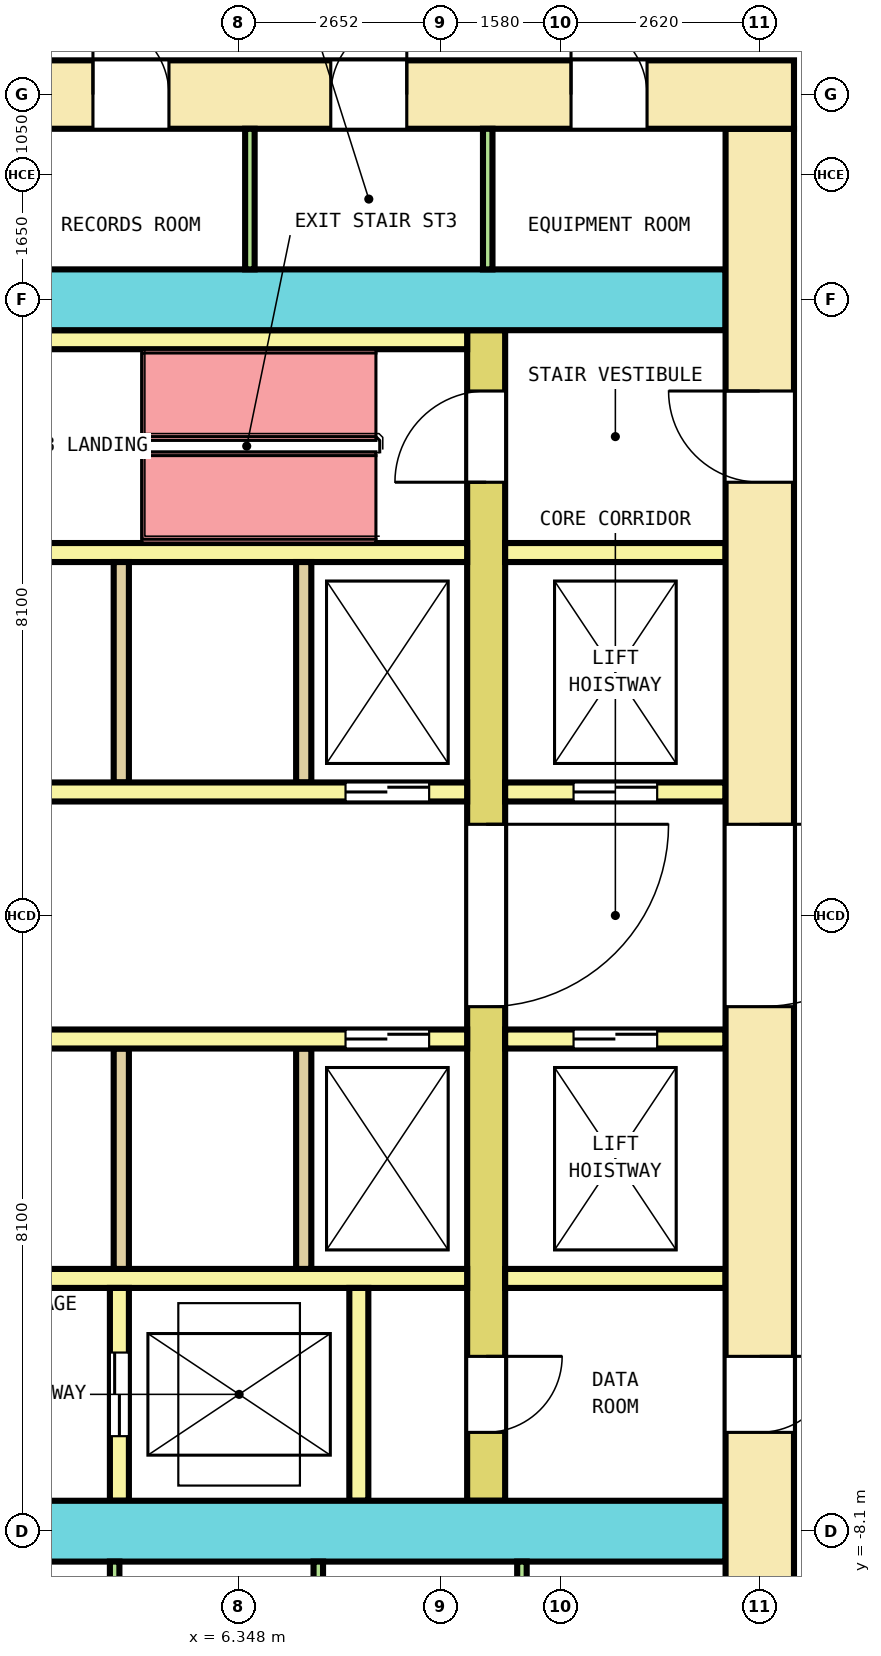
"""IFC4 building model, lengths in metres.
Left out: names, types, materials, properties, quantities, classifications, styles, units other than length and angle.
Written with IfcOpenShell. Run it as: python <this file> out.ifc"""

import sys

from ifc_helpers import new_model, si_unit, direction, frame, frame_2d, origin, place, context, subcontext, project, spatial, rectangle, extrude, element, fill, save


model = new_model("IFC4")
c1 = context("Model", 3, precision=1e-05, world=origin(), true_north=direction((0.0, 1.0)))
c2 = subcontext(c1, "Body", "Model", "MODEL_VIEW")
j1 = project(units=[si_unit("LENGTHUNIT", "METRE"), si_unit("PLANEANGLEUNIT", "RADIAN")], contexts=[c1])
p1 = place(None, origin())
s1 = spatial("IfcSite", under=j1, at=p1, CompositionType="ELEMENT")
p2 = place(p1, origin())
s2 = spatial("IfcBuilding", under=s1, at=p2, CompositionType="ELEMENT")
p3 = place(p2, frame((0.0, 0.0, 23.4)))
s3 = spatial("IfcBuildingStorey", under=s2, at=p3, CompositionType="ELEMENT", Elevation=23.4)
p4 = place(p3, frame((-13.65, 10.8, 0.0), z_axis=(0.0, 0.0, 1.0), x_axis=(1.0, 0.0, 0.0)))
e1 = element("IfcWall", 1, at=p4, inside=s3, PredefinedType="SHEAR", context=c2, shape_type="SweptSolid", body=[
    extrude(rectangle(XDim=27.3, YDim=0.9, at=frame_2d((13.65, 0.0))), origin(), (0.0, 0.0, 1.0), 4.1),
])
p5 = place(p4, frame((1.892, 0.0, 0.0)))
e2 = element("IfcOpeningElement", 2, at=p5, cuts=e1, PredefinedType="OPENING", context=c2, shape_type="SweptSolid", body=[
    extrude(rectangle(XDim=1.0, YDim=2.1, at=frame_2d((0.5, 1.05))), frame((0.0, 0.46, 0.0), z_axis=(0.0, -1.0, 0.0), x_axis=(1.0, 0.0, 0.0)), (0.0, 0.0, 1.0), 0.92),
])
p6 = place(p4, frame((4.97, 0.0, 0.0)))
e3 = element("IfcOpeningElement", 3, at=p6, cuts=e1, PredefinedType="OPENING", context=c2, shape_type="SweptSolid", body=[
    extrude(rectangle(XDim=1.0, YDim=2.1, at=frame_2d((0.5, 1.05))), frame((0.0, 0.46, 0.0), z_axis=(0.0, -1.0, 0.0), x_axis=(1.0, 0.0, 0.0)), (0.0, 0.0, 1.0), 0.92),
])
p7 = place(p4, frame((8.017, 0.0, 0.0)))
e4 = element("IfcOpeningElement", 4, at=p7, cuts=e1, PredefinedType="OPENING", context=c2, shape_type="SweptSolid", body=[
    extrude(rectangle(XDim=1.0, YDim=2.1, at=frame_2d((0.5, 1.05))), frame((0.0, 0.46, 0.0), z_axis=(0.0, -1.0, 0.0), x_axis=(1.0, 0.0, 0.0)), (0.0, 0.0, 1.0), 0.92),
])
p8 = place(p4, frame((11.064, 0.0, 0.0)))
e5 = element("IfcOpeningElement", 5, at=p8, cuts=e1, PredefinedType="OPENING", context=c2, shape_type="SweptSolid", body=[
    extrude(rectangle(XDim=1.0, YDim=2.1, at=frame_2d((0.5, 1.05))), frame((0.0, 0.46, 0.0), z_axis=(0.0, -1.0, 0.0), x_axis=(1.0, 0.0, 0.0)), (0.0, 0.0, 1.0), 0.92),
])
p9 = place(p4, frame((18.077, 0.0, 0.0)))
e6 = element("IfcOpeningElement", 6, at=p9, cuts=e1, PredefinedType="OPENING", context=c2, shape_type="SweptSolid", body=[
    extrude(rectangle(XDim=1.0, YDim=2.1, at=frame_2d((0.5, 1.05))), frame((0.0, 0.46, 0.0), z_axis=(0.0, -1.0, 0.0), x_axis=(1.0, 0.0, 0.0)), (0.0, 0.0, 1.0), 0.92),
])
p10 = place(p4, frame((21.206, 0.0, 0.0)))
e7 = element("IfcOpeningElement", 7, at=p10, cuts=e1, PredefinedType="OPENING", context=c2, shape_type="SweptSolid", body=[
    extrude(rectangle(XDim=1.0, YDim=2.1, at=frame_2d((0.5, 1.05))), frame((0.0, 0.46, 0.0), z_axis=(0.0, -1.0, 0.0), x_axis=(1.0, 0.0, 0.0)), (0.0, 0.0, 1.0), 0.92),
])
p11 = place(p4, frame((24.367, 0.0, 0.0)))
e8 = element("IfcOpeningElement", 8, at=p11, cuts=e1, PredefinedType="OPENING", context=c2, shape_type="SweptSolid", body=[
    extrude(rectangle(XDim=1.0, YDim=2.1, at=frame_2d((0.5, 1.05))), frame((0.0, 0.46, 0.0), z_axis=(0.0, -1.0, 0.0), x_axis=(1.0, 0.0, 0.0)), (0.0, 0.0, 1.0), 0.92),
])
p12 = place(p4, frame((14.575, 0.0, 0.0)))
e9 = element("IfcOpeningElement", 9, at=p12, cuts=e1, PredefinedType="OPENING", context=c2, shape_type="SweptSolid", body=[
    extrude(rectangle(XDim=1.4, YDim=2.1, at=frame_2d((0.7, 1.05))), frame((0.0, 0.46, 0.0), z_axis=(0.0, -1.0, 0.0), x_axis=(1.0, 0.0, 0.0)), (0.0, 0.0, 1.0), 0.92),
])
p13 = place(p3, frame((13.2, -10.35, 0.0), z_axis=(0.0, 0.0, 1.0), x_axis=(0.0, 1.0, 0.0)))
e10 = element("IfcWall", 10, at=p13, inside=s3, PredefinedType="SHEAR", context=c2, shape_type="SweptSolid", body=[
    extrude(rectangle(XDim=20.7, YDim=0.9, at=frame_2d((10.35, 0.0))), origin(), (0.0, 0.0, 1.0), 4.1),
])
p14 = place(p13, frame((9.15, 0.0, 0.0)))
e11 = element("IfcOpeningElement", 11, at=p14, cuts=e10, PredefinedType="OPENING", context=c2, shape_type="SweptSolid", body=[
    extrude(rectangle(XDim=2.4, YDim=2.1, at=frame_2d((1.2, 1.05))), frame((0.0, 0.46, 0.0), z_axis=(0.0, -1.0, 0.0), x_axis=(1.0, 0.0, 0.0)), (0.0, 0.0, 1.0), 0.92),
])
p15 = place(p13, frame((16.05, 0.0, 0.0)))
e12 = element("IfcOpeningElement", 12, at=p15, cuts=e10, PredefinedType="OPENING", context=c2, shape_type="SweptSolid", body=[
    extrude(rectangle(XDim=1.2, YDim=2.1, at=frame_2d((0.6, 1.05))), frame((0.0, 0.46, 0.0), z_axis=(0.0, -1.0, 0.0), x_axis=(1.0, 0.0, 0.0)), (0.0, 0.0, 1.0), 0.92),
])
p16 = place(p13, frame((3.55, 0.0, 0.0)))
e13 = element("IfcOpeningElement", 13, at=p16, cuts=e10, PredefinedType="OPENING", context=c2, shape_type="SweptSolid", body=[
    extrude(rectangle(XDim=1.0, YDim=2.1, at=frame_2d((0.5, 1.05))), frame((0.0, 0.46, 0.0), z_axis=(0.0, -1.0, 0.0), x_axis=(1.0, 0.0, 0.0)), (0.0, 0.0, 1.0), 0.92),
])
p17 = place(p3, frame((-12.75, 8.1, 0.0), z_axis=(0.0, 0.0, 1.0), x_axis=(1.0, 0.0, 0.0)))
e14 = element("IfcWall", 14, at=p17, inside=s3, PredefinedType="SHEAR", context=c2, shape_type="SweptSolid", body=[
    extrude(rectangle(XDim=25.5, YDim=0.8, at=frame_2d((12.75, 0.0))), origin(), (0.0, 0.0, 1.0), 4.1),
])
p18 = place(p17, frame((13.675, 0.0, 0.0)))
e15 = element("IfcOpeningElement", 15, at=p18, cuts=e14, PredefinedType="OPENING", context=c2, shape_type="SweptSolid", body=[
    extrude(rectangle(XDim=1.4, YDim=2.1, at=frame_2d((0.7, 1.05))), frame((0.0, 0.41, 0.0), z_axis=(0.0, -1.0, 0.0), x_axis=(1.0, 0.0, 0.0)), (0.0, 0.0, 1.0), 0.82),
])
p19 = place(p3, frame((-12.75, -8.1, 0.0), z_axis=(0.0, 0.0, 1.0), x_axis=(1.0, 0.0, 0.0)))
e16 = element("IfcWall", 16, at=p19, inside=s3, PredefinedType="SHEAR", context=c2, shape_type="SweptSolid", body=[
    extrude(rectangle(XDim=25.5, YDim=0.8, at=frame_2d((12.75, 0.0))), origin(), (0.0, 0.0, 1.0), 4.1),
])
p20 = place(p19, frame((14.3, 0.0, 0.0)))
e17 = element("IfcOpeningElement", 17, at=p20, cuts=e16, PredefinedType="OPENING", context=c2, shape_type="SweptSolid", body=[
    extrude(rectangle(XDim=1.2, YDim=2.1, at=frame_2d((0.6, 1.05))), frame((0.0, 0.41, 0.0), z_axis=(0.0, -1.0, 0.0), x_axis=(1.0, 0.0, 0.0)), (0.0, 0.0, 1.0), 0.82),
])
p21 = place(p3, frame((9.6, -7.7, 0.0), z_axis=(0.0, 0.0, 1.0), x_axis=(0.0, 1.0, 0.0)))
e18 = element("IfcWall", 18, at=p21, inside=s3, PredefinedType="SHEAR", context=c2, shape_type="SweptSolid", body=[
    extrude(rectangle(XDim=15.4, YDim=0.5, at=frame_2d((7.7, 0.0))), origin(), (0.0, 0.0, 1.0), 4.1),
])
p22 = place(p21, frame((6.5, 0.0, 0.0)))
e19 = element("IfcOpeningElement", 19, at=p22, cuts=e18, PredefinedType="OPENING", context=c2, shape_type="SweptSolid", body=[
    extrude(rectangle(XDim=2.4, YDim=2.1, at=frame_2d((1.2, 1.05))), frame((0.0, 0.26, 0.0), z_axis=(0.0, -1.0, 0.0), x_axis=(1.0, 0.0, 0.0)), (0.0, 0.0, 1.0), 0.52),
])
p23 = place(p21, frame((13.4, 0.0, 0.0)))
e20 = element("IfcOpeningElement", 20, at=p23, cuts=e18, PredefinedType="OPENING", context=c2, shape_type="SweptSolid", body=[
    extrude(rectangle(XDim=1.2, YDim=2.1, at=frame_2d((0.6, 1.05))), frame((0.0, 0.26, 0.0), z_axis=(0.0, -1.0, 0.0), x_axis=(1.0, 0.0, 0.0)), (0.0, 0.0, 1.0), 0.52),
])
p24 = place(p21, frame((0.9, 0.0, 0.0)))
e21 = element("IfcOpeningElement", 21, at=p24, cuts=e18, PredefinedType="OPENING", context=c2, shape_type="SweptSolid", body=[
    extrude(rectangle(XDim=1.0, YDim=2.1, at=frame_2d((0.5, 1.05))), frame((0.0, 0.26, 0.0), z_axis=(0.0, -1.0, 0.0), x_axis=(1.0, 0.0, 0.0)), (0.0, 0.0, 1.0), 0.52),
])
p25 = place(p3, frame((-9.35, 1.625, 0.0), z_axis=(0.0, 0.0, 1.0), x_axis=(1.0, 0.0, 0.0)))
e22 = element("IfcWall", 22, at=p25, inside=s3, PredefinedType="SOLIDWALL", context=c2, shape_type="SweptSolid", body=[
    extrude(rectangle(XDim=18.7, YDim=0.25, at=frame_2d((9.35, 0.0))), origin(), (0.0, 0.0, 1.0), 4.1),
])
p26 = place(p25, frame((0.5, 0.0, 0.0)))
e23 = element("IfcOpeningElement", 23, at=p26, cuts=e22, PredefinedType="OPENING", context=c2, shape_type="SweptSolid", body=[
    extrude(rectangle(XDim=1.1, YDim=2.1, at=frame_2d((0.55, 1.05))), frame((0.0, 0.135, 0.0), z_axis=(0.0, -1.0, 0.0), x_axis=(1.0, 0.0, 0.0)), (0.0, 0.0, 1.0), 0.27),
])
p27 = place(p25, frame((17.1, 0.0, 0.0)))
e24 = element("IfcOpeningElement", 24, at=p27, cuts=e22, PredefinedType="OPENING", context=c2, shape_type="SweptSolid", body=[
    extrude(rectangle(XDim=1.1, YDim=2.1, at=frame_2d((0.55, 1.05))), frame((0.0, 0.135, 0.0), z_axis=(0.0, -1.0, 0.0), x_axis=(1.0, 0.0, 0.0)), (0.0, 0.0, 1.0), 0.27),
])
p28 = place(p3, frame((9.85, 1.625, 0.0), z_axis=(0.0, 0.0, 1.0), x_axis=(1.0, 0.0, 0.0)))
e25 = element("IfcWall", 25, at=p28, inside=s3, PredefinedType="SOLIDWALL", context=c2, shape_type="SweptSolid", body=[
    extrude(rectangle(XDim=2.9, YDim=0.25, at=frame_2d((1.45, 0.0))), origin(), (0.0, 0.0, 1.0), 4.1),
])
p29 = place(p28, frame((0.9, 0.0, 0.0)))
e26 = element("IfcOpeningElement", 26, at=p29, cuts=e25, PredefinedType="OPENING", context=c2, shape_type="SweptSolid", body=[
    extrude(rectangle(XDim=1.1, YDim=2.1, at=frame_2d((0.55, 1.05))), frame((0.0, 0.135, 0.0), z_axis=(0.0, -1.0, 0.0), x_axis=(1.0, 0.0, 0.0)), (0.0, 0.0, 1.0), 0.27),
])
p30 = place(p3, frame((-9.35, 4.775, 0.0), z_axis=(0.0, 0.0, 1.0), x_axis=(1.0, 0.0, 0.0)))
e27 = element("IfcWall", 27, at=p30, inside=s3, PredefinedType="SOLIDWALL", context=c2, shape_type="SweptSolid", body=[
    extrude(rectangle(XDim=18.7, YDim=0.25, at=frame_2d((9.35, 0.0))), origin(), (0.0, 0.0, 1.0), 4.1),
])
p31 = place(p3, frame((9.85, 4.775, 0.0), z_axis=(0.0, 0.0, 1.0), x_axis=(1.0, 0.0, 0.0)))
e28 = element("IfcWall", 28, at=p31, inside=s3, PredefinedType="SOLIDWALL", context=c2, shape_type="SweptSolid", body=[
    extrude(rectangle(XDim=2.9, YDim=0.25, at=frame_2d((1.45, 0.0))), origin(), (0.0, 0.0, 1.0), 4.1),
])
for number, where, z_axis, x_axis in (
    (29, (4.8, 1.75, 0.0), (0.0, 0.0, 1.0), (0.0, 1.0, 0.0)),
    (30, (7.2, 1.75, 0.0), (0.0, 0.0, 1.0), (0.0, 1.0, 0.0)),
):
    element("IfcWall", number, at=place(p3, frame(where, z_axis=z_axis, x_axis=x_axis)), inside=s3, PredefinedType="SOLIDWALL", context=c2, shape_type="SweptSolid", body=[
        extrude(rectangle(XDim=2.9, YDim=0.2, at=frame_2d((1.45, 0.0))), origin(), (0.0, 0.0, 1.0), 4.1),
    ])
p32 = place(p3, frame((-9.35, -1.625, 0.0), z_axis=(0.0, 0.0, 1.0), x_axis=(1.0, 0.0, 0.0)))
e31 = element("IfcWall", 31, at=p32, inside=s3, PredefinedType="SOLIDWALL", context=c2, shape_type="SweptSolid", body=[
    extrude(rectangle(XDim=18.7, YDim=0.25, at=frame_2d((9.35, 0.0))), origin(), (0.0, 0.0, 1.0), 4.1),
])
p33 = place(p32, frame((0.5, 0.0, 0.0)))
e32 = element("IfcOpeningElement", 32, at=p33, cuts=e31, PredefinedType="OPENING", context=c2, shape_type="SweptSolid", body=[
    extrude(rectangle(XDim=1.1, YDim=2.1, at=frame_2d((0.55, 1.05))), frame((0.0, 0.135, 0.0), z_axis=(0.0, -1.0, 0.0), x_axis=(1.0, 0.0, 0.0)), (0.0, 0.0, 1.0), 0.27),
])
p34 = place(p32, frame((17.1, 0.0, 0.0)))
e33 = element("IfcOpeningElement", 33, at=p34, cuts=e31, PredefinedType="OPENING", context=c2, shape_type="SweptSolid", body=[
    extrude(rectangle(XDim=1.1, YDim=2.1, at=frame_2d((0.55, 1.05))), frame((0.0, 0.135, 0.0), z_axis=(0.0, -1.0, 0.0), x_axis=(1.0, 0.0, 0.0)), (0.0, 0.0, 1.0), 0.27),
])
p35 = place(p3, frame((9.85, -1.625, 0.0), z_axis=(0.0, 0.0, 1.0), x_axis=(1.0, 0.0, 0.0)))
e34 = element("IfcWall", 34, at=p35, inside=s3, PredefinedType="SOLIDWALL", context=c2, shape_type="SweptSolid", body=[
    extrude(rectangle(XDim=2.9, YDim=0.25, at=frame_2d((1.45, 0.0))), origin(), (0.0, 0.0, 1.0), 4.1),
])
p36 = place(p35, frame((0.9, 0.0, 0.0)))
e35 = element("IfcOpeningElement", 35, at=p36, cuts=e34, PredefinedType="OPENING", context=c2, shape_type="SweptSolid", body=[
    extrude(rectangle(XDim=1.1, YDim=2.1, at=frame_2d((0.55, 1.05))), frame((0.0, 0.135, 0.0), z_axis=(0.0, -1.0, 0.0), x_axis=(1.0, 0.0, 0.0)), (0.0, 0.0, 1.0), 0.27),
])
p37 = place(p3, frame((-9.35, -4.775, 0.0), z_axis=(0.0, 0.0, 1.0), x_axis=(1.0, 0.0, 0.0)))
e36 = element("IfcWall", 36, at=p37, inside=s3, PredefinedType="SOLIDWALL", context=c2, shape_type="SweptSolid", body=[
    extrude(rectangle(XDim=18.7, YDim=0.25, at=frame_2d((9.35, 0.0))), origin(), (0.0, 0.0, 1.0), 4.1),
])
p38 = place(p3, frame((9.85, -4.775, 0.0), z_axis=(0.0, 0.0, 1.0), x_axis=(1.0, 0.0, 0.0)))
e37 = element("IfcWall", 37, at=p38, inside=s3, PredefinedType="SOLIDWALL", context=c2, shape_type="SweptSolid", body=[
    extrude(rectangle(XDim=2.9, YDim=0.25, at=frame_2d((1.45, 0.0))), origin(), (0.0, 0.0, 1.0), 4.1),
])
for number, where, z_axis, x_axis in (
    (38, (4.8, -4.65, 0.0), (0.0, 0.0, 1.0), (0.0, 1.0, 0.0)),
    (39, (7.2, -4.65, 0.0), (0.0, 0.0, 1.0), (0.0, 1.0, 0.0)),
):
    element("IfcWall", number, at=place(p3, frame(where, z_axis=z_axis, x_axis=x_axis)), inside=s3, PredefinedType="SOLIDWALL", context=c2, shape_type="SweptSolid", body=[
        extrude(rectangle(XDim=2.9, YDim=0.2, at=frame_2d((1.45, 0.0))), origin(), (0.0, 0.0, 1.0), 4.1),
    ])
p39 = place(p3, frame((3.55, 7.575, 0.0), z_axis=(0.0, 0.0, 1.0), x_axis=(1.0, 0.0, 0.0)))
e40 = element("IfcWall", 40, at=p39, inside=s3, PredefinedType="SOLIDWALL", context=c2, shape_type="SweptSolid", body=[
    extrude(rectangle(XDim=5.8, YDim=0.25, at=frame_2d((2.9, 0.0))), origin(), (0.0, 0.0, 1.0), 4.1),
])
p40 = place(p3, frame((4.775, -7.7, 0.0), z_axis=(0.0, 0.0, 1.0), x_axis=(0.0, 1.0, 0.0)))
e41 = element("IfcWall", 41, at=p40, inside=s3, PredefinedType="SOLIDWALL", context=c2, shape_type="SweptSolid", body=[
    extrude(rectangle(XDim=2.8, YDim=0.25, at=frame_2d((1.4, 0.0))), origin(), (0.0, 0.0, 1.0), 4.1),
])
p41 = place(p40, frame((0.85, 0.0, 0.0)))
e42 = element("IfcOpeningElement", 42, at=p41, cuts=e41, PredefinedType="OPENING", context=c2, shape_type="SweptSolid", body=[
    extrude(rectangle(XDim=1.1, YDim=2.1, at=frame_2d((0.55, 1.05))), frame((0.0, 0.135, 0.0), z_axis=(0.0, -1.0, 0.0), x_axis=(1.0, 0.0, 0.0)), (0.0, 0.0, 1.0), 0.27),
])
p42 = place(p3, frame((7.925, -7.7, 0.0), z_axis=(0.0, 0.0, 1.0), x_axis=(0.0, 1.0, 0.0)))
e43 = element("IfcWall", 43, at=p42, inside=s3, PredefinedType="SOLIDWALL", context=c2, shape_type="SweptSolid", body=[
    extrude(rectangle(XDim=2.8, YDim=0.25, at=frame_2d((1.4, 0.0))), origin(), (0.0, 0.0, 1.0), 4.1),
])
for number, where, z_axis, x_axis in (
    (44, (6.492, 8.5, 0.0), (0.0, 0.0, 1.0), (0.0, 1.0, 0.0)),
    (45, (9.621, 8.5, 0.0), (0.0, 0.0, 1.0), (0.0, 1.0, 0.0)),
    (46, (4.712, -10.35, 0.0), (0.0, 0.0, 1.0), (0.0, 1.0, 0.0)),
    (47, (7.392, -10.35, 0.0), (0.0, 0.0, 1.0), (0.0, 1.0, 0.0)),
    (48, (10.071, -10.35, 0.0), (0.0, 0.0, 1.0), (0.0, 1.0, 0.0)),
):
    element("IfcWall", number, at=place(p3, frame(where, z_axis=z_axis, x_axis=x_axis)), inside=s3, PredefinedType="PARTITIONING", context=c2, shape_type="SweptSolid", body=[
        extrude(rectangle(XDim=1.85, YDim=0.125, at=frame_2d((0.925, 0.0))), origin(), (0.0, 0.0, 1.0), 4.1),
    ])
p43 = place(p27, origin())
e49 = element("IfcDoor", 49, at=p43, inside=s3, OperationType="DOUBLE_DOOR_SLIDING", PredefinedType="DOOR", context=c2, shape_type="SweptSolid", body=[
    extrude(rectangle(XDim=1.1, YDim=2.1, at=frame_2d((0.55, 1.05))), frame((0.0, 0.075, 0.0), z_axis=(0.0, -1.0, 0.0), x_axis=(1.0, 0.0, 0.0)), (0.0, 0.0, 1.0), 0.15),
])
fill(e24, e49)
p44 = place(p29, origin())
e50 = element("IfcDoor", 50, at=p44, inside=s3, OperationType="DOUBLE_DOOR_SLIDING", PredefinedType="DOOR", context=c2, shape_type="SweptSolid", body=[
    extrude(rectangle(XDim=1.1, YDim=2.1, at=frame_2d((0.55, 1.05))), frame((0.0, 0.075, 0.0), z_axis=(0.0, -1.0, 0.0), x_axis=(1.0, 0.0, 0.0)), (0.0, 0.0, 1.0), 0.15),
])
fill(e26, e50)
p45 = place(p34, origin())
e51 = element("IfcDoor", 51, at=p45, inside=s3, OperationType="DOUBLE_DOOR_SLIDING", PredefinedType="DOOR", context=c2, shape_type="SweptSolid", body=[
    extrude(rectangle(XDim=1.1, YDim=2.1, at=frame_2d((0.55, 1.05))), frame((0.0, 0.075, 0.0), z_axis=(0.0, -1.0, 0.0), x_axis=(1.0, 0.0, 0.0)), (0.0, 0.0, 1.0), 0.15),
])
fill(e33, e51)
p46 = place(p36, origin())
e52 = element("IfcDoor", 52, at=p46, inside=s3, OperationType="DOUBLE_DOOR_SLIDING", PredefinedType="DOOR", context=c2, shape_type="SweptSolid", body=[
    extrude(rectangle(XDim=1.1, YDim=2.1, at=frame_2d((0.55, 1.05))), frame((0.0, 0.075, 0.0), z_axis=(0.0, -1.0, 0.0), x_axis=(1.0, 0.0, 0.0)), (0.0, 0.0, 1.0), 0.15),
])
fill(e35, e52)
p47 = place(p41, origin())
e53 = element("IfcDoor", 53, at=p47, inside=s3, OperationType="DOUBLE_DOOR_SLIDING", PredefinedType="DOOR", context=c2, shape_type="SweptSolid", body=[
    extrude(rectangle(XDim=1.1, YDim=2.1, at=frame_2d((0.55, 1.05))), frame((0.0, 0.075, 0.0), z_axis=(0.0, -1.0, 0.0), x_axis=(1.0, 0.0, 0.0)), (0.0, 0.0, 1.0), 0.15),
])
fill(e42, e53)
p48 = place(p22, origin())
e54 = element("IfcDoor", 54, at=p48, inside=s3, OperationType="DOUBLE_DOOR_SINGLE_SWING", PredefinedType="DOOR", context=c2, shape_type="SweptSolid", body=[
    extrude(rectangle(XDim=2.4, YDim=2.1, at=frame_2d((1.2, 1.05))), frame((0.0, 0.2, 0.0), z_axis=(0.0, -1.0, 0.0), x_axis=(1.0, 0.0, 0.0)), (0.0, 0.0, 1.0), 0.4),
])
fill(e19, e54)
p49 = place(p14, origin())
e55 = element("IfcDoor", 55, at=p49, inside=s3, OperationType="DOUBLE_DOOR_SINGLE_SWING", PredefinedType="DOOR", context=c2, shape_type="SweptSolid", body=[
    extrude(rectangle(XDim=2.4, YDim=2.1, at=frame_2d((1.2, 1.05))), frame((0.0, 0.3, 0.0), z_axis=(0.0, -1.0, 0.0), x_axis=(1.0, 0.0, 0.0)), (0.0, 0.0, 1.0), 0.6),
])
fill(e11, e55)
p50 = place(p23, origin())
e56 = element("IfcDoor", 56, at=p50, inside=s3, OperationType="SINGLE_SWING_LEFT", PredefinedType="DOOR", context=c2, shape_type="SweptSolid", body=[
    extrude(rectangle(XDim=1.2, YDim=2.1, at=frame_2d((0.6, 1.05))), frame((0.0, 0.2, 0.0), z_axis=(0.0, -1.0, 0.0), x_axis=(1.0, 0.0, 0.0)), (0.0, 0.0, 1.0), 0.4),
])
fill(e20, e56)
p51 = place(p15, origin())
e57 = element("IfcDoor", 57, at=p51, inside=s3, OperationType="SINGLE_SWING_RIGHT", PredefinedType="DOOR", context=c2, shape_type="SweptSolid", body=[
    extrude(rectangle(XDim=1.2, YDim=2.1, at=frame_2d((0.6, 1.05))), frame((0.0, 0.3, 0.0), z_axis=(0.0, -1.0, 0.0), x_axis=(1.0, 0.0, 0.0)), (0.0, 0.0, 1.0), 0.6),
])
fill(e12, e57)
p52 = place(p24, origin())
e58 = element("IfcDoor", 58, at=p52, inside=s3, OperationType="SINGLE_SWING_LEFT", PredefinedType="DOOR", context=c2, shape_type="SweptSolid", body=[
    extrude(rectangle(XDim=1.0, YDim=2.1, at=frame_2d((0.5, 1.05))), frame((0.0, 0.2, 0.0), z_axis=(0.0, -1.0, 0.0), x_axis=(1.0, 0.0, 0.0)), (0.0, 0.0, 1.0), 0.4),
])
fill(e21, e58)
p53 = place(p16, origin())
e59 = element("IfcDoor", 59, at=p53, inside=s3, OperationType="SINGLE_SWING_RIGHT", PredefinedType="DOOR", context=c2, shape_type="SweptSolid", body=[
    extrude(rectangle(XDim=1.0, YDim=2.1, at=frame_2d((0.5, 1.05))), frame((0.0, 0.3, 0.0), z_axis=(0.0, -1.0, 0.0), x_axis=(1.0, 0.0, 0.0)), (0.0, 0.0, 1.0), 0.6),
])
fill(e13, e59)
p54 = place(p9, origin())
e60 = element("IfcDoor", 60, at=p54, inside=s3, OperationType="SINGLE_SWING_LEFT", PredefinedType="DOOR", context=c2, shape_type="SweptSolid", body=[
    extrude(rectangle(XDim=1.0, YDim=2.1, at=frame_2d((0.5, 1.05))), frame((0.0, 0.3, 0.0), z_axis=(0.0, -1.0, 0.0), x_axis=(1.0, 0.0, 0.0)), (0.0, 0.0, 1.0), 0.6),
])
fill(e6, e60)
p55 = place(p10, origin())
e61 = element("IfcDoor", 61, at=p55, inside=s3, OperationType="SINGLE_SWING_RIGHT", PredefinedType="DOOR", context=c2, shape_type="SweptSolid", body=[
    extrude(rectangle(XDim=1.0, YDim=2.1, at=frame_2d((0.5, 1.05))), frame((0.0, 0.3, 0.0), z_axis=(0.0, -1.0, 0.0), x_axis=(1.0, 0.0, 0.0)), (0.0, 0.0, 1.0), 0.6),
])
fill(e7, e61)
p56 = place(p11, origin())
e62 = element("IfcDoor", 62, at=p56, inside=s3, OperationType="SINGLE_SWING_LEFT", PredefinedType="DOOR", context=c2, shape_type="SweptSolid", body=[
    extrude(rectangle(XDim=1.0, YDim=2.1, at=frame_2d((0.5, 1.05))), frame((0.0, 0.3, 0.0), z_axis=(0.0, -1.0, 0.0), x_axis=(1.0, 0.0, 0.0)), (0.0, 0.0, 1.0), 0.6),
])
fill(e8, e62)
save(model, sys.argv[1])
